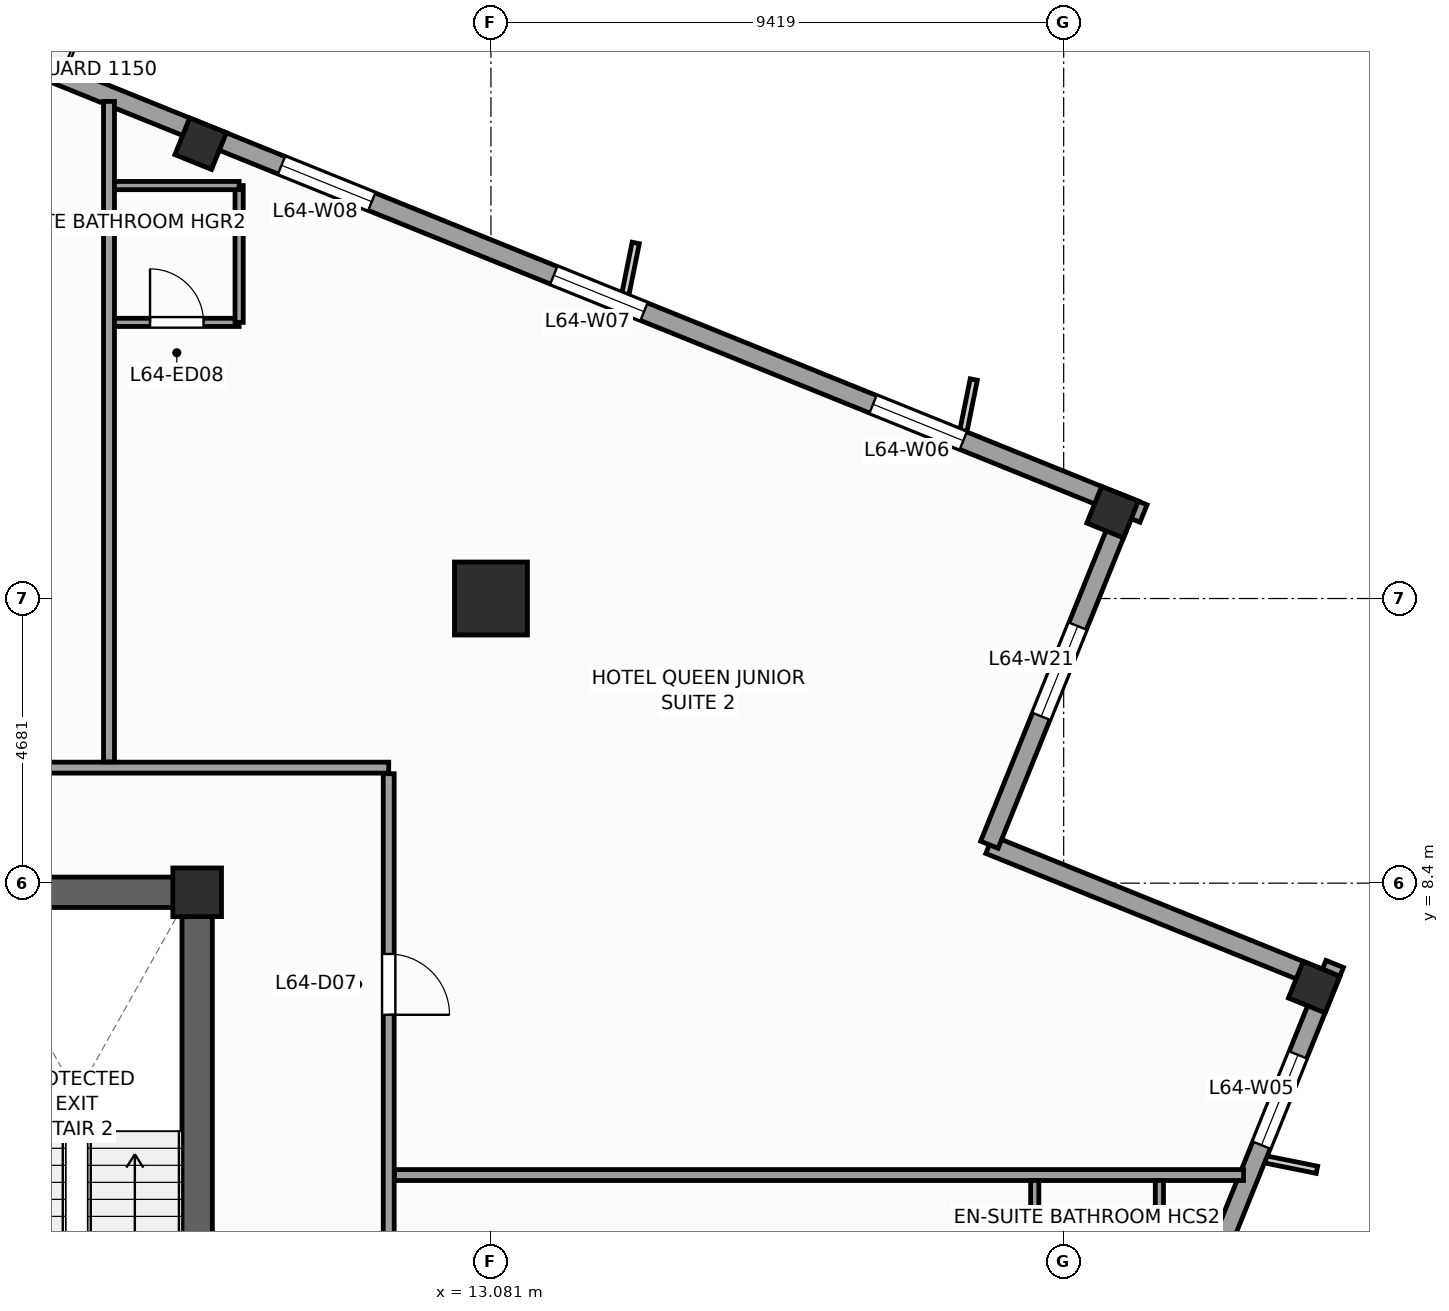
"""IFC4 building model, lengths in metres.
Left out: names, types, materials, properties, quantities, classifications, styles, units other than length and angle.
Written with IfcOpenShell. Run it as: python <this file> out.ifc"""

import sys

from ifc_helpers import new_model, si_unit, direction, frame, frame_2d, origin, origin_2d, place, context, subcontext, project, spatial, rectangle, extrude, source, transform, mapped, element, fill, save


model = new_model("IFC4")
c1 = context("Model", 3, precision=1e-05, world=origin(), true_north=direction((0.0, 1.0)))
c2 = subcontext(c1, "Body", "Model", "MODEL_VIEW")
j1 = project(units=[si_unit("LENGTHUNIT", "METRE"), si_unit("PLANEANGLEUNIT", "RADIAN")], contexts=[c1])
p1 = place(None, origin())
s1 = spatial("IfcSite", under=j1, at=p1, CompositionType="ELEMENT")
p2 = place(p1, origin())
s2 = spatial("IfcBuilding", under=s1, at=p2, CompositionType="ELEMENT")
p3 = place(p2, frame((0.0, 0.0, 265.2)))
s3 = spatial("IfcBuildingStorey", under=s2, at=p3, CompositionType="ELEMENT", Elevation=265.2)
p4 = place(p3, frame((-8.5, 8.25, 0.0), z_axis=(0.0, 0.0, 1.0), x_axis=(1.0, 0.0, 0.0)))
e1 = element("IfcWall", 1, at=p4, inside=s3, PredefinedType="SHEAR", context=c2, shape_type="SweptSolid", body=[
    extrude(rectangle(XDim=17.0, YDim=0.5, at=frame_2d((8.5, 0.0))), origin(), (0.0, 0.0, 1.0), 3.6),
])
p5 = place(p3, frame((8.25, -8.0, 0.0), z_axis=(0.0, 0.0, 1.0), x_axis=(0.0, 1.0, 0.0)))
e2 = element("IfcWall", 2, at=p5, inside=s3, PredefinedType="SHEAR", context=c2, shape_type="SweptSolid", body=[
    extrude(rectangle(XDim=16.0, YDim=0.5, at=frame_2d((8.0, 0.0))), origin(), (0.0, 0.0, 1.0), 3.6),
])
p6 = place(p5, frame((4.69, 0.0, 0.0)))
e3 = element("IfcOpeningElement", 3, at=p6, cuts=e2, PredefinedType="OPENING", context=c2, shape_type="SweptSolid", body=[
    extrude(rectangle(XDim=1.3, YDim=2.2, at=frame_2d((0.65, 1.1))), frame((0.0, 0.26, 0.0), z_axis=(0.0, -1.0, 0.0), x_axis=(1.0, 0.0, 0.0)), (0.0, 0.0, 1.0), 0.52),
])
m1 = source(origin(), c2, "Body", "SweptSolid", [
    extrude(rectangle(XDim=0.8, YDim=0.8, at=origin_2d()), origin(), (0.0, 0.0, 1.0), 3.6),
])
p7 = place(p3, frame((8.25, 8.25, 0.0), z_axis=(0.0, 0.0, 1.0), x_axis=(1.0, 0.0, 0.0)))
e4 = element("IfcColumn", 4, at=p7, inside=s3, PredefinedType="PILASTER", context=c2, shape_type="MappedRepresentation", body=[
    mapped(m1, transform((0.0, 0.0, 0.0), scale=1.0)),
])
m2 = source(origin(), c2, "Body", "SweptSolid", [
    extrude(rectangle(XDim=1.2, YDim=1.2, at=origin_2d()), origin(), (0.0, 0.0, 1.0), 3.6),
])
p8 = place(p3, frame((13.081, 13.081, 0.0), z_axis=(0.0, 0.0, 1.0), x_axis=(1.0, 0.0, 0.0)))
e5 = element("IfcColumn", 5, at=p8, inside=s3, PredefinedType="COLUMN", context=c2, shape_type="MappedRepresentation", body=[
    mapped(m2, transform((0.0, 0.0, 0.0), scale=1.0)),
])
m3 = source(origin(), c2, "Body", "SweptSolid", [
    extrude(rectangle(XDim=0.65, YDim=0.65, at=origin_2d()), origin(), (0.0, 0.0, 1.0), 3.6),
])
for number, where, z_axis, x_axis in (
    (6, (26.62, 6.69, 0.0), (0.0, 0.0, 1.0), (0.375, 0.927, 0.0)),
    (7, (23.304, 14.501, 0.0), (0.0, 0.0, 1.0), (0.375, 0.927, 0.0)),
    (8, (8.307, 20.56, 0.0), (0.0, 0.0, 1.0), (0.375, 0.927, 0.0)),
):
    element("IfcColumn", number, at=place(p3, frame(where, z_axis=z_axis, x_axis=x_axis)), inside=s3, PredefinedType="COLUMN", context=c2, shape_type="MappedRepresentation", body=[
        mapped(m3, transform((0.0, 0.0, 0.0), scale=1.0)),
    ])
p9 = place(p3, frame((14.479, -23.813, 0.0), z_axis=(0.0, 0.0, 1.0), x_axis=(0.374609557019, 0.927182657188, 0.0)))
e9 = element("IfcWall", 9, at=p9, inside=s3, PredefinedType="STANDARD", context=c2, shape_type="SweptSolid", body=[
    extrude(rectangle(XDim=33.31, YDim=0.31, at=frame_2d((16.655, 0.0))), origin(), (0.0, 0.0, 1.0), 2.75),
])
p10 = place(p9, frame((3.197, 0.0, 0.47)))
e10 = element("IfcOpeningElement", 10, at=p10, cuts=e9, PredefinedType="OPENING", context=c2, shape_type="SweptSolid", body=[
    extrude(rectangle(XDim=1.6, YDim=2.1, at=frame_2d((0.8, 1.05))), frame((0.0, 0.165, 0.0), z_axis=(0.0, -1.0, 0.0), x_axis=(1.0, 0.0, 0.0)), (0.0, 0.0, 1.0), 0.33),
])
p11 = place(p9, frame((8.86, 0.0, 0.47)))
e11 = element("IfcOpeningElement", 11, at=p11, cuts=e9, PredefinedType="OPENING", context=c2, shape_type="SweptSolid", body=[
    extrude(rectangle(XDim=1.6, YDim=2.1, at=frame_2d((0.8, 1.05))), frame((0.0, 0.165, 0.0), z_axis=(0.0, -1.0, 0.0), x_axis=(1.0, 0.0, 0.0)), (0.0, 0.0, 1.0), 0.33),
])
p12 = place(p9, frame((14.439, 0.0, 0.47)))
e12 = element("IfcOpeningElement", 12, at=p12, cuts=e9, PredefinedType="OPENING", context=c2, shape_type="SweptSolid", body=[
    extrude(rectangle(XDim=1.6, YDim=2.1, at=frame_2d((0.8, 1.05))), frame((0.0, 0.165, 0.0), z_axis=(0.0, -1.0, 0.0), x_axis=(1.0, 0.0, 0.0)), (0.0, 0.0, 1.0), 0.33),
])
p13 = place(p9, frame((22.601, 0.0, 0.47)))
e13 = element("IfcOpeningElement", 13, at=p13, cuts=e9, PredefinedType="OPENING", context=c2, shape_type="SweptSolid", body=[
    extrude(rectangle(XDim=1.6, YDim=2.1, at=frame_2d((0.8, 1.05))), frame((0.0, 0.165, 0.0), z_axis=(0.0, -1.0, 0.0), x_axis=(1.0, 0.0, 0.0)), (0.0, 0.0, 1.0), 0.33),
])
p14 = place(p9, frame((30.097, 0.0, 0.47)))
e14 = element("IfcOpeningElement", 14, at=p14, cuts=e9, PredefinedType="OPENING", context=c2, shape_type="SweptSolid", body=[
    extrude(rectangle(XDim=1.6, YDim=2.1, at=frame_2d((0.8, 1.05))), frame((0.0, 0.165, 0.0), z_axis=(0.0, -1.0, 0.0), x_axis=(1.0, 0.0, 0.0)), (0.0, 0.0, 1.0), 0.33),
])
p15 = place(p3, frame((26.841, 6.784, 0.0), z_axis=(0.0, 0.0, 1.0), x_axis=(-0.927171722085, 0.374636620962, 0.0)))
e15 = element("IfcWall", 15, at=p15, inside=s3, PredefinedType="STANDARD", context=c2, shape_type="SweptSolid", body=[
    extrude(rectangle(XDim=6.0, YDim=0.31, at=frame_2d((3.0, 0.0))), origin(), (0.0, 0.0, 1.0), 2.65),
])
p16 = place(p3, frame((21.278, 9.032, 0.0), z_axis=(0.0, 0.0, 1.0), x_axis=(0.374602739196, 0.927185411764, 0.0)))
e16 = element("IfcWall", 16, at=p16, inside=s3, PredefinedType="STANDARD", context=c2, shape_type="SweptSolid", body=[
    extrude(rectangle(XDim=6.155, YDim=0.31, at=frame_2d((3.078, 0.0))), origin(), (0.0, 0.0, 1.0), 3.35),
])
p17 = place(p16, frame((2.278, 0.0, 0.47)))
e17 = element("IfcOpeningElement", 17, at=p17, cuts=e16, PredefinedType="OPENING", context=c2, shape_type="SweptSolid", body=[
    extrude(rectangle(XDim=1.6, YDim=2.1, at=frame_2d((0.8, 1.05))), frame((0.0, 0.165, 0.0), z_axis=(0.0, -1.0, 0.0), x_axis=(1.0, 0.0, 0.0)), (0.0, 0.0, 1.0), 0.33),
])
p18 = place(p3, frame((23.813, 14.479, 0.0), z_axis=(0.0, 0.0, 1.0), x_axis=(-0.927182657188, 0.374609557019, 0.0)))
e18 = element("IfcWall", 18, at=p18, inside=s3, PredefinedType="STANDARD", context=c2, shape_type="SweptSolid", body=[
    extrude(rectangle(XDim=33.31, YDim=0.31, at=frame_2d((16.655, 0.0))), origin(), (0.0, 0.0, 1.0), 2.75),
])
p19 = place(p18, frame((21.73, 0.0, 0.0)))
e19 = element("IfcOpeningElement", 19, at=p19, cuts=e18, PredefinedType="OPENING", context=c2, shape_type="SweptSolid", body=[
    extrude(rectangle(XDim=1.05, YDim=2.25, at=frame_2d((0.525, 1.125))), frame((0.0, 0.165, 0.0), z_axis=(0.0, -1.0, 0.0), x_axis=(1.0, 0.0, 0.0)), (0.0, 0.0, 1.0), 0.33),
])
p20 = place(p18, frame((3.197, 0.0, 0.47)))
e20 = element("IfcOpeningElement", 20, at=p20, cuts=e18, PredefinedType="OPENING", context=c2, shape_type="SweptSolid", body=[
    extrude(rectangle(XDim=1.6, YDim=2.1, at=frame_2d((0.8, 1.05))), frame((0.0, 0.165, 0.0), z_axis=(0.0, -1.0, 0.0), x_axis=(1.0, 0.0, 0.0)), (0.0, 0.0, 1.0), 0.33),
])
p21 = place(p18, frame((8.86, 0.0, 0.47)))
e21 = element("IfcOpeningElement", 21, at=p21, cuts=e18, PredefinedType="OPENING", context=c2, shape_type="SweptSolid", body=[
    extrude(rectangle(XDim=1.6, YDim=2.1, at=frame_2d((0.8, 1.05))), frame((0.0, 0.165, 0.0), z_axis=(0.0, -1.0, 0.0), x_axis=(1.0, 0.0, 0.0)), (0.0, 0.0, 1.0), 0.33),
])
p22 = place(p18, frame((13.689, 0.0, 0.47)))
e22 = element("IfcOpeningElement", 22, at=p22, cuts=e18, PredefinedType="OPENING", context=c2, shape_type="SweptSolid", body=[
    extrude(rectangle(XDim=1.6, YDim=2.1, at=frame_2d((0.8, 1.05))), frame((0.0, 0.165, 0.0), z_axis=(0.0, -1.0, 0.0), x_axis=(1.0, 0.0, 0.0)), (0.0, 0.0, 1.0), 0.33),
])
p23 = place(p18, frame((24.101, 0.0, 0.47)))
e23 = element("IfcOpeningElement", 23, at=p23, cuts=e18, PredefinedType="OPENING", context=c2, shape_type="SweptSolid", body=[
    extrude(rectangle(XDim=1.6, YDim=2.1, at=frame_2d((0.8, 1.05))), frame((0.0, 0.165, 0.0), z_axis=(0.0, -1.0, 0.0), x_axis=(1.0, 0.0, 0.0)), (0.0, 0.0, 1.0), 0.33),
])
p24 = place(p18, frame((27.847, 0.0, 0.47)))
e24 = element("IfcOpeningElement", 24, at=p24, cuts=e18, PredefinedType="OPENING", context=c2, shape_type="SweptSolid", body=[
    extrude(rectangle(XDim=1.6, YDim=2.1, at=frame_2d((0.8, 1.05))), frame((0.0, 0.165, 0.0), z_axis=(0.0, -1.0, 0.0), x_axis=(1.0, 0.0, 0.0)), (0.0, 0.0, 1.0), 0.33),
])
p25 = place(p3, frame((-10.3, 10.3, 0.0), z_axis=(0.0, 0.0, 1.0), x_axis=(1.0, 0.0, 0.0)))
e25 = element("IfcWall", 25, at=p25, inside=s3, PredefinedType="PARTITIONING", context=c2, shape_type="SweptSolid", body=[
    extrude(rectangle(XDim=21.7, YDim=0.18, at=frame_2d((10.85, 0.0))), origin(), (0.0, 0.0, 1.0), 3.35),
])
p26 = place(p25, frame((9.8, 0.0, 0.0)))
e26 = element("IfcOpeningElement", 26, at=p26, cuts=e25, PredefinedType="OPENING", context=c2, shape_type="SweptSolid", body=[
    extrude(rectangle(XDim=1.0, YDim=2.15, at=frame_2d((0.5, 1.075))), frame((0.0, 0.1, 0.0), z_axis=(0.0, -1.0, 0.0), x_axis=(1.0, 0.0, 0.0)), (0.0, 0.0, 1.0), 0.2),
])
p27 = place(p3, frame((11.4, -11.3, 0.0), z_axis=(0.0, 0.0, 1.0), x_axis=(0.0, 1.0, 0.0)))
e27 = element("IfcWall", 27, at=p27, inside=s3, PredefinedType="PARTITIONING", context=c2, shape_type="SweptSolid", body=[
    extrude(rectangle(XDim=21.5, YDim=0.18, at=frame_2d((10.75, 0.0))), origin(), (0.0, 0.0, 1.0), 3.35),
])
p28 = place(p27, frame((17.536, 0.0, 0.0)))
e28 = element("IfcOpeningElement", 28, at=p28, cuts=e27, PredefinedType="OPENING", context=c2, shape_type="SweptSolid", body=[
    extrude(rectangle(XDim=1.0, YDim=2.15, at=frame_2d((0.5, 1.075))), frame((0.0, 0.1, 0.0), z_axis=(0.0, -1.0, 0.0), x_axis=(1.0, 0.0, 0.0)), (0.0, 0.0, 1.0), 0.2),
])
p29 = place(p27, frame((10.8, 0.0, 0.0)))
e29 = element("IfcOpeningElement", 29, at=p29, cuts=e27, PredefinedType="OPENING", context=c2, shape_type="SweptSolid", body=[
    extrude(rectangle(XDim=1.0, YDim=2.15, at=frame_2d((0.5, 1.075))), frame((0.0, 0.1, 0.0), z_axis=(0.0, -1.0, 0.0), x_axis=(1.0, 0.0, 0.0)), (0.0, 0.0, 1.0), 0.2),
])
p30 = place(p27, frame((5.4, 0.0, 0.0)))
e30 = element("IfcOpeningElement", 30, at=p30, cuts=e27, PredefinedType="OPENING", context=c2, shape_type="SweptSolid", body=[
    extrude(rectangle(XDim=1.0, YDim=2.15, at=frame_2d((0.5, 1.075))), frame((0.0, 0.1, 0.0), z_axis=(0.0, -1.0, 0.0), x_axis=(1.0, 0.0, 0.0)), (0.0, 0.0, 1.0), 0.2),
])
p31 = place(p3, frame((6.8, 10.395, 0.0), z_axis=(0.0, 0.0, 1.0), x_axis=(0.0, 1.0, 0.0)))
e31 = element("IfcWall", 31, at=p31, inside=s3, PredefinedType="PARTITIONING", context=c2, shape_type="SweptSolid", body=[
    extrude(rectangle(XDim=10.86, YDim=0.18, at=frame_2d((5.43, 0.0))), origin(), (0.0, 0.0, 1.0), 3.35),
])
p32 = place(p3, frame((11.495, 3.6, 0.0), z_axis=(0.0, 0.0, 1.0), x_axis=(1.0, 0.0, 0.0)))
e32 = element("IfcWall", 32, at=p32, inside=s3, PredefinedType="PARTITIONING", context=c2, shape_type="SweptSolid", body=[
    extrude(rectangle(XDim=13.962, YDim=0.18, at=frame_2d((6.981, 0.0))), origin(), (0.0, 0.0, 1.0), 3.02),
])
p33 = place(p3, frame((6.89, 17.622, 0.0), z_axis=(0.0, 0.0, 1.0), x_axis=(1.0, 0.0, 0.0)))
e33 = element("IfcWall", 33, at=p33, inside=s3, PredefinedType="PARTITIONING", context=c2, shape_type="SweptSolid", body=[
    extrude(rectangle(XDim=2.05, YDim=0.135, at=frame_2d((1.025, 0.0))), origin(), (0.0, 0.0, 1.0), 2.95),
])
p34 = place(p33, frame((0.585, 0.0, 0.0)))
e34 = element("IfcOpeningElement", 34, at=p34, cuts=e33, PredefinedType="OPENING", context=c2, shape_type="SweptSolid", body=[
    extrude(rectangle(XDim=0.88, YDim=2.1, at=frame_2d((0.44, 1.05))), frame((0.0, 0.078, 0.0), z_axis=(0.0, -1.0, 0.0), x_axis=(1.0, 0.0, 0.0)), (0.0, 0.0, 1.0), 0.155),
])
p35 = place(p3, frame((8.94, 17.622, 0.0), z_axis=(0.0, 0.0, 1.0), x_axis=(0.0, 1.0, 0.0)))
e35 = element("IfcWall", 35, at=p35, inside=s3, PredefinedType="PARTITIONING", context=c2, shape_type="SweptSolid", body=[
    extrude(rectangle(XDim=2.25, YDim=0.135, at=frame_2d((1.125, 0.0))), origin(), (0.0, 0.0, 1.0), 3.35),
])
p36 = place(p3, frame((6.89, 19.872, 0.0), z_axis=(0.0, 0.0, 1.0), x_axis=(1.0, 0.0, 0.0)))
e36 = element("IfcWall", 36, at=p36, inside=s3, PredefinedType="PARTITIONING", context=c2, shape_type="SweptSolid", body=[
    extrude(rectangle(XDim=2.05, YDim=0.135, at=frame_2d((1.025, 0.0))), origin(), (0.0, 0.0, 1.0), 3.35),
])
for number, where, z_axis, x_axis in (
    (37, (24.074, 1.26, 0.0), (0.0, 0.0, 1.0), (0.0, 1.0, 0.0)),
    (38, (22.024, 1.26, 0.0), (0.0, 0.0, 1.0), (0.0, 1.0, 0.0)),
):
    element("IfcWall", number, at=place(p3, frame(where, z_axis=z_axis, x_axis=x_axis)), inside=s3, PredefinedType="PARTITIONING", context=c2, shape_type="SweptSolid", body=[
        extrude(rectangle(XDim=2.25, YDim=0.135, at=frame_2d((1.125, 0.0))), origin(), (0.0, 0.0, 1.0), 3.35),
    ])
m4 = source(origin(), c2, "Body", "SweptSolid", [
    extrude(rectangle(XDim=1.6, YDim=2.1, at=frame_2d((0.8, 1.05))), frame((0.0, 0.03, 0.0), z_axis=(0.0, -1.0, 0.0), x_axis=(1.0, 0.0, 0.0)), (0.0, 0.0, 1.0), 0.06),
])
p37 = place(p14, origin())
e39 = element("IfcWindow", 39, at=p37, inside=s3, PartitioningType="SINGLE_PANEL", PredefinedType="WINDOW", context=c2, shape_type="MappedRepresentation", body=[
    mapped(m4, transform((0.0, 0.0, 0.0), scale=1.0)),
])
fill(e14, e39)
p38 = place(p20, origin())
e40 = element("IfcWindow", 40, at=p38, inside=s3, PartitioningType="SINGLE_PANEL", PredefinedType="WINDOW", context=c2, shape_type="MappedRepresentation", body=[
    mapped(m4, transform((0.0, 0.0, 0.0), scale=1.0)),
])
fill(e20, e40)
p39 = place(p21, origin())
e41 = element("IfcWindow", 41, at=p39, inside=s3, PartitioningType="SINGLE_PANEL", PredefinedType="WINDOW", context=c2, shape_type="MappedRepresentation", body=[
    mapped(m4, transform((0.0, 0.0, 0.0), scale=1.0)),
])
fill(e21, e41)
p40 = place(p22, origin())
e42 = element("IfcWindow", 42, at=p40, inside=s3, PartitioningType="SINGLE_PANEL", PredefinedType="WINDOW", context=c2, shape_type="MappedRepresentation", body=[
    mapped(m4, transform((0.0, 0.0, 0.0), scale=1.0)),
])
fill(e22, e42)
p41 = place(p17, origin())
e43 = element("IfcWindow", 43, at=p41, inside=s3, PartitioningType="SINGLE_PANEL", PredefinedType="WINDOW", context=c2, shape_type="MappedRepresentation", body=[
    mapped(m4, transform((0.0, 0.0, 0.0), scale=1.0)),
])
fill(e17, e43)
m5 = source(origin(), c2, "Body", "SweptSolid", [
    extrude(rectangle(XDim=1.0, YDim=2.15, at=frame_2d((0.5, 1.075))), frame((0.0, 0.025, 0.0), z_axis=(0.0, -1.0, 0.0), x_axis=(1.0, 0.0, 0.0)), (0.0, 0.0, 1.0), 0.05),
])
p42 = place(p28, frame((1.0, 0.0, 0.0), z_axis=(0.0, 0.0, 1.0), x_axis=(-1.0, 0.0, 0.0)))
e44 = element("IfcDoor", 44, at=p42, inside=s3, OperationType="SINGLE_SWING_LEFT", PredefinedType="DOOR", context=c2, shape_type="MappedRepresentation", body=[
    mapped(m5, transform((0.0, 0.0, 0.0), scale=1.0)),
])
fill(e28, e44)
m6 = source(origin(), c2, "Body", "SweptSolid", [
    extrude(rectangle(XDim=0.88, YDim=2.1, at=frame_2d((0.44, 1.05))), frame((0.0, 0.025, 0.0), z_axis=(0.0, -1.0, 0.0), x_axis=(1.0, 0.0, 0.0)), (0.0, 0.0, 1.0), 0.05),
])
p43 = place(p34, origin())
e45 = element("IfcDoor", 45, at=p43, inside=s3, OperationType="SINGLE_SWING_LEFT", PredefinedType="DOOR", context=c2, shape_type="MappedRepresentation", body=[
    mapped(m6, transform((0.0, 0.0, 0.0), scale=1.0)),
])
fill(e34, e45)
save(model, sys.argv[1])
